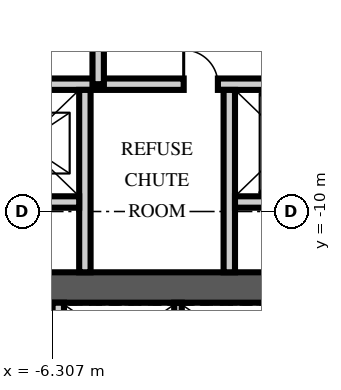
"""IFC4 building model, lengths in metres.
Left out: names, types, materials, properties, quantities, classifications, styles, units other than length and angle.
Written with IfcOpenShell. Run it as: python <this file> out.ifc"""

import sys

from ifc_helpers import new_model, si_unit, direction, frame, frame_2d, origin, place, context, subcontext, project, spatial, rectangle, extrude, element, fill, save


model = new_model("IFC4")
c1 = context("Model", 3, precision=1e-05, world=origin(), true_north=direction((0.0, 1.0)))
c2 = subcontext(c1, "Body", "Model", "MODEL_VIEW")
j1 = project(units=[si_unit("LENGTHUNIT", "METRE"), si_unit("PLANEANGLEUNIT", "RADIAN")], contexts=[c1])
p1 = place(None, origin())
s1 = spatial("IfcSite", under=j1, at=p1, CompositionType="ELEMENT")
p2 = place(p1, origin())
s2 = spatial("IfcBuilding", under=s1, at=p2, CompositionType="ELEMENT")
p3 = place(p2, frame((0.0, 0.0, 28.5)))
s3 = spatial("IfcBuildingStorey", under=s2, at=p3, CompositionType="ELEMENT", Elevation=28.5)
p4 = place(p3, frame((-15.5, -12.0, -0.25), z_axis=(0.0, 0.0, 1.0), x_axis=(1.0, 0.0, 0.0)))
e1 = element("IfcWall", 1, at=p4, inside=s3, PredefinedType="SHEAR", context=c2, shape_type="SweptSolid", body=[
    extrude(rectangle(XDim=31.0, YDim=0.8, at=frame_2d((15.5, 0.0))), origin(), (0.0, 0.0, 1.0), 3.75),
])
p5 = place(p3, frame((-8.5, -6.65, 0.0), z_axis=(0.0, 0.0, 1.0), x_axis=(1.0, 0.0, 0.0)))
e2 = element("IfcWall", 2, at=p5, inside=s3, PredefinedType="PARTITIONING", context=c2, shape_type="SweptSolid", body=[
    extrude(rectangle(XDim=17.0, YDim=0.3, at=frame_2d((8.5, 0.0))), origin(), (0.0, 0.0, 1.0), 3.5),
])
p6 = place(p5, frame((7.8, 0.0, 0.0)))
e3 = element("IfcOpeningElement", 3, at=p6, cuts=e2, PredefinedType="OPENING", context=c2, shape_type="SweptSolid", body=[
    extrude(rectangle(XDim=1.3, YDim=2.4, at=frame_2d((0.65, 1.2))), frame((0.0, 0.16, 0.0), z_axis=(0.0, -1.0, 0.0), x_axis=(1.0, 0.0, 0.0)), (0.0, 0.0, 1.0), 0.32),
])
p7 = place(p5, frame((5.65, 0.0, 0.0)))
e4 = element("IfcOpeningElement", 4, at=p7, cuts=e2, PredefinedType="OPENING", context=c2, shape_type="SweptSolid", body=[
    extrude(rectangle(XDim=0.9, YDim=2.1, at=frame_2d((0.45, 1.05))), frame((0.0, 0.16, 0.0), z_axis=(0.0, -1.0, 0.0), x_axis=(1.0, 0.0, 0.0)), (0.0, 0.0, 1.0), 0.32),
])
p8 = place(p5, frame((10.4, 0.0, 0.0)))
e5 = element("IfcOpeningElement", 5, at=p8, cuts=e2, PredefinedType="OPENING", context=c2, shape_type="SweptSolid", body=[
    extrude(rectangle(XDim=0.9, YDim=2.1, at=frame_2d((0.45, 1.05))), frame((0.0, 0.16, 0.0), z_axis=(0.0, -1.0, 0.0), x_axis=(1.0, 0.0, 0.0)), (0.0, 0.0, 1.0), 0.32),
])
for number, where, z_axis, x_axis in (
    (6, (-5.45, -11.6, 0.0), (0.0, 0.0, 1.0), (0.0, 1.0, 0.0)),
    (7, (-1.65, -11.6, 0.0), (0.0, 0.0, 1.0), (0.0, 1.0, 0.0)),
):
    element("IfcWall", number, at=place(p3, frame(where, z_axis=z_axis, x_axis=x_axis)), inside=s3, PredefinedType="PARTITIONING", context=c2, shape_type="SweptSolid", body=[
        extrude(rectangle(XDim=4.8, YDim=0.3, at=frame_2d((2.4, 0.0))), origin(), (0.0, 0.0, 1.0), 3.5),
    ])
for number, where, z_axis, x_axis in (
    (8, (-8.5, -9.75, 0.0), (0.0, 0.0, 1.0), (1.0, 0.0, 0.0)),
    (9, (-1.5, -9.75, 0.0), (0.0, 0.0, 1.0), (1.0, 0.0, 0.0)),
):
    element("IfcWall", number, at=place(p3, frame(where, z_axis=z_axis, x_axis=x_axis)), inside=s3, PredefinedType="PARTITIONING", context=c2, shape_type="SweptSolid", body=[
        extrude(rectangle(XDim=2.9, YDim=0.3, at=frame_2d((1.45, 0.0))), origin(), (0.0, 0.0, 1.0), 3.5),
    ])
p9 = place(p3, frame((-6.15, -14.5, 0.0), z_axis=(0.0, 0.0, 1.0), x_axis=(0.0, 1.0, 0.0)))
e10 = element("IfcWall", 10, at=p9, inside=s3, PredefinedType="PARTITIONING", context=c2, shape_type="SweptSolid", body=[
    extrude(rectangle(XDim=2.1, YDim=0.3, at=frame_2d((1.05, 0.0))), origin(), (0.0, 0.0, 1.0), 3.5),
])
p10 = place(p3, frame((-3.0, -14.5, 0.0), z_axis=(0.0, 0.0, 1.0), x_axis=(0.0, 1.0, 0.0)))
e11 = element("IfcWall", 11, at=p10, inside=s3, PredefinedType="PARTITIONING", context=c2, shape_type="SweptSolid", body=[
    extrude(rectangle(XDim=2.1, YDim=0.2, at=frame_2d((1.05, 0.0))), origin(), (0.0, 0.0, 1.0), 3.5),
])
p11 = place(p3, frame((-5.1, -6.65, 0.0), z_axis=(0.0, 0.0, 1.0), x_axis=(0.0, 1.0, 0.0)))
e12 = element("IfcWall", 12, at=p11, inside=s3, PredefinedType="PARTITIONING", context=c2, shape_type="SweptSolid", body=[
    extrude(rectangle(XDim=9.45, YDim=0.3, at=frame_2d((4.725, 0.0))), origin(), (0.0, 0.0, 1.0), 3.5),
])
p12 = place(p11, frame((2.648, 0.0, 0.0)))
e13 = element("IfcOpeningElement", 13, at=p12, cuts=e12, PredefinedType="OPENING", context=c2, shape_type="SweptSolid", body=[
    extrude(rectangle(XDim=0.9, YDim=2.1, at=frame_2d((0.45, 1.05))), frame((0.0, 0.16, 0.0), z_axis=(0.0, -1.0, 0.0), x_axis=(1.0, 0.0, 0.0)), (0.0, 0.0, 1.0), 0.32),
])
p13 = place(p11, frame((7.373, 0.0, 0.0)))
e14 = element("IfcOpeningElement", 14, at=p13, cuts=e12, PredefinedType="OPENING", context=c2, shape_type="SweptSolid", body=[
    extrude(rectangle(XDim=0.9, YDim=2.1, at=frame_2d((0.45, 1.05))), frame((0.0, 0.16, 0.0), z_axis=(0.0, -1.0, 0.0), x_axis=(1.0, 0.0, 0.0)), (0.0, 0.0, 1.0), 0.32),
])
p14 = place(p7, origin())
e15 = element("IfcDoor", 15, at=p14, inside=s3, OperationType="SINGLE_SWING_LEFT", PredefinedType="DOOR", context=c2, shape_type="SweptSolid", body=[
    extrude(rectangle(XDim=0.9, YDim=2.1, at=frame_2d((0.45, 1.05))), frame((0.0, 0.025, 0.0), z_axis=(0.0, -1.0, 0.0), x_axis=(1.0, 0.0, 0.0)), (0.0, 0.0, 1.0), 0.05),
])
fill(e4, e15)
save(model, sys.argv[1])
